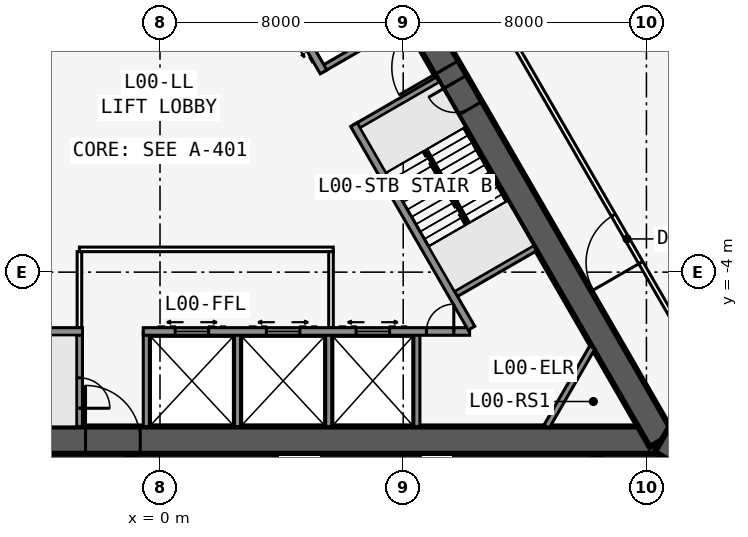
"""IFC4 building model, lengths in metres.
Left out: names, types, materials, properties, quantities, classifications, styles, units other than length and angle.
Written with IfcOpenShell. Run it as: python <this file> out.ifc"""

import sys

from ifc_helpers import new_model, si_unit, direction, frame, frame_2d, origin, place, context, subcontext, project, spatial, rectangle, extrude, element, fill, save


model = new_model("IFC4")
c1 = context("Model", 3, precision=1e-05, world=origin(), true_north=direction((0.0, 1.0)))
c2 = subcontext(c1, "Body", "Model", "MODEL_VIEW")
j1 = project(units=[si_unit("LENGTHUNIT", "METRE"), si_unit("PLANEANGLEUNIT", "RADIAN")], contexts=[c1])
p1 = place(None, origin())
s1 = spatial("IfcSite", under=j1, at=p1, CompositionType="ELEMENT")
p2 = place(p1, origin())
s2 = spatial("IfcBuilding", under=s1, at=p2, CompositionType="ELEMENT")
p3 = place(p2, origin())
s3 = spatial("IfcBuildingStorey", under=s2, at=p3, CompositionType="ELEMENT", Elevation=0.0)
p4 = place(p3, frame((-16.5, -9.526, -0.3), z_axis=(0.0, 0.0, 1.0), x_axis=(1.0, 0.0, 0.0)))
e1 = element("IfcWall", 1, at=p4, inside=s3, PredefinedType="SHEAR", context=c2, shape_type="SweptSolid", body=[
    extrude(rectangle(XDim=33.0, YDim=0.9, at=frame_2d((16.5, 0.0))), origin(), (0.0, 0.0, 1.0), 6.3),
])
p5 = place(p4, frame((14.05, 0.0, 0.3)))
e2 = element("IfcOpeningElement", 2, at=p5, cuts=e1, PredefinedType="OPENING", context=c2, shape_type="SweptSolid", body=[
    extrude(rectangle(XDim=1.8, YDim=2.13, at=frame_2d((0.9, 1.065))), frame((0.0, 0.46, 0.0), z_axis=(0.0, -1.0, 0.0), x_axis=(1.0, 0.0, 0.0)), (0.0, 0.0, 1.0), 0.92),
])
p6 = place(p3, frame((-10.183, -5.951, -0.3), z_axis=(0.0, 0.0, 1.0), x_axis=(1.0, 0.0, 0.0)))
e3 = element("IfcWall", 3, at=p6, inside=s3, PredefinedType="SOLIDWALL", context=c2, shape_type="SweptSolid", body=[
    extrude(rectangle(XDim=7.633, YDim=0.25, at=frame_2d((3.816, 0.0))), origin(), (0.0, 0.0, 1.0), 6.05),
])
p7 = place(p3, frame((-0.55, -5.951, -0.3), z_axis=(0.0, 0.0, 1.0), x_axis=(1.0, 0.0, 0.0)))
e4 = element("IfcWall", 4, at=p7, inside=s3, PredefinedType="SOLIDWALL", context=c2, shape_type="SweptSolid", body=[
    extrude(rectangle(XDim=10.733, YDim=0.25, at=frame_2d((5.366, 0.0))), origin(), (0.0, 0.0, 1.0), 6.05),
])
p8 = place(p7, frame((9.314, 0.0, 0.3)))
e5 = element("IfcOpeningElement", 5, at=p8, cuts=e4, PredefinedType="OPENING", context=c2, shape_type="SweptSolid", body=[
    extrude(rectangle(XDim=0.9, YDim=2.13, at=frame_2d((0.45, 1.065))), frame((0.0, 0.135, 0.0), z_axis=(0.0, -1.0, 0.0), x_axis=(1.0, 0.0, 0.0)), (0.0, 0.0, 1.0), 0.27),
])
p9 = place(p7, frame((1.05, 0.0, 0.3)))
e6 = element("IfcOpeningElement", 6, at=p9, cuts=e4, PredefinedType="OPENING", context=c2, shape_type="SweptSolid", body=[
    extrude(rectangle(XDim=1.1, YDim=2.13, at=frame_2d((0.55, 1.065))), frame((0.0, 0.135, 0.0), z_axis=(0.0, -1.0, 0.0), x_axis=(1.0, 0.0, 0.0)), (0.0, 0.0, 1.0), 0.27),
])
p10 = place(p7, frame((4.05, 0.0, 0.3)))
e7 = element("IfcOpeningElement", 7, at=p10, cuts=e4, PredefinedType="OPENING", context=c2, shape_type="SweptSolid", body=[
    extrude(rectangle(XDim=1.1, YDim=2.13, at=frame_2d((0.55, 1.065))), frame((0.0, 0.135, 0.0), z_axis=(0.0, -1.0, 0.0), x_axis=(1.0, 0.0, 0.0)), (0.0, 0.0, 1.0), 0.27),
])
p11 = place(p7, frame((7.0, 0.0, 0.3)))
e8 = element("IfcOpeningElement", 8, at=p11, cuts=e4, PredefinedType="OPENING", context=c2, shape_type="SweptSolid", body=[
    extrude(rectangle(XDim=1.1, YDim=2.13, at=frame_2d((0.55, 1.065))), frame((0.0, 0.135, 0.0), z_axis=(0.0, -1.0, 0.0), x_axis=(1.0, 0.0, 0.0)), (0.0, 0.0, 1.0), 0.27),
])
p12 = place(p3, frame((-2.65, -5.951, -0.3), z_axis=(0.0, 0.0, 1.0), x_axis=(0.0, -1.0, 0.0)))
e9 = element("IfcWall", 9, at=p12, inside=s3, PredefinedType="SOLIDWALL", context=c2, shape_type="SweptSolid", body=[
    extrude(rectangle(XDim=3.125, YDim=0.2, at=frame_2d((1.562, 0.0))), origin(), (0.0, 0.0, 1.0), 6.05),
])
p13 = place(p12, frame((1.525, 0.0, 0.3)))
e10 = element("IfcOpeningElement", 10, at=p13, cuts=e9, PredefinedType="OPENING", context=c2, shape_type="SweptSolid", body=[
    extrude(rectangle(XDim=1.0, YDim=2.13, at=frame_2d((0.5, 1.065))), frame((0.0, 0.11, 0.0), z_axis=(0.0, -1.0, 0.0), x_axis=(1.0, 0.0, 0.0)), (0.0, 0.0, 1.0), 0.22),
])
for number, where, z_axis, x_axis in (
    (11, (-0.45, -5.951, -0.3), (0.0, 0.0, 1.0), (0.0, -1.0, 0.0)),
    (12, (2.55, -5.951, -0.3), (0.0, 0.0, 1.0), (0.0, -1.0, 0.0)),
    (13, (5.55, -5.951, -0.3), (0.0, 0.0, 1.0), (0.0, -1.0, 0.0)),
    (14, (8.45, -5.951, -0.3), (0.0, 0.0, 1.0), (0.0, -1.0, 0.0)),
):
    element("IfcWall", number, at=place(p3, frame(where, z_axis=z_axis, x_axis=x_axis)), inside=s3, PredefinedType="SOLIDWALL", context=c2, shape_type="SweptSolid", body=[
        extrude(rectangle(XDim=3.125, YDim=0.2, at=frame_2d((1.562, 0.0))), origin(), (0.0, 0.0, 1.0), 6.05),
    ])
p14 = place(p3, frame((16.5, -9.526, -0.3), z_axis=(0.0, 0.0, 1.0), x_axis=(-0.499999749417, 0.866025548458, 0.0)))
e15 = element("IfcWall", 15, at=p14, inside=s3, PredefinedType="SHEAR", context=c2, shape_type="SweptSolid", body=[
    extrude(rectangle(XDim=33.0, YDim=0.9, at=frame_2d((16.5, 0.0))), origin(), (0.0, 0.0, 1.0), 6.3),
])
p15 = place(p14, frame((14.15, 0.0, 0.3)))
e16 = element("IfcOpeningElement", 16, at=p15, cuts=e15, PredefinedType="OPENING", context=c2, shape_type="SweptSolid", body=[
    extrude(rectangle(XDim=1.8, YDim=2.13, at=frame_2d((0.9, 1.065))), frame((0.0, 0.46, 0.0), z_axis=(0.0, -1.0, 0.0), x_axis=(1.0, 0.0, 0.0)), (0.0, 0.0, 1.0), 0.92),
])
p16 = place(p14, frame((12.6, 0.0, 0.3)))
e17 = element("IfcOpeningElement", 17, at=p16, cuts=e15, PredefinedType="OPENING", context=c2, shape_type="SweptSolid", body=[
    extrude(rectangle(XDim=1.0, YDim=2.13, at=frame_2d((0.5, 1.065))), frame((0.0, 0.46, 0.0), z_axis=(0.0, -1.0, 0.0), x_axis=(1.0, 0.0, 0.0)), (0.0, 0.0, 1.0), 0.92),
])
p17 = place(p3, frame((10.245, -5.843, -0.3), z_axis=(0.0, 0.0, 1.0), x_axis=(-0.499993009313, 0.866029439822, 0.0)))
e18 = element("IfcWall", 18, at=p17, inside=s3, PredefinedType="SOLIDWALL", context=c2, shape_type="SweptSolid", body=[
    extrude(rectangle(XDim=7.733, YDim=0.25, at=frame_2d((3.866, 0.0))), origin(), (0.0, 0.0, 1.0), 6.05),
])
p18 = place(p3, frame((5.379, 2.586, -0.3), z_axis=(0.0, 0.0, 1.0), x_axis=(-0.500001375892, 0.866024609411, 0.0)))
e19 = element("IfcWall", 19, at=p18, inside=s3, PredefinedType="SOLIDWALL", context=c2, shape_type="SweptSolid", body=[
    extrude(rectangle(XDim=10.633, YDim=0.25, at=frame_2d((5.316, 0.0))), origin(), (0.0, 0.0, 1.0), 6.05),
])
p19 = place(p18, frame((9.164, 0.0, 0.3)))
e20 = element("IfcOpeningElement", 20, at=p19, cuts=e19, PredefinedType="OPENING", context=c2, shape_type="SweptSolid", body=[
    extrude(rectangle(XDim=0.9, YDim=2.13, at=frame_2d((0.45, 1.065))), frame((0.0, 0.135, 0.0), z_axis=(0.0, -1.0, 0.0), x_axis=(1.0, 0.0, 0.0)), (0.0, 0.0, 1.0), 0.27),
])
p20 = place(p18, frame((1.0, 0.0, 0.3)))
e21 = element("IfcOpeningElement", 21, at=p20, cuts=e19, PredefinedType="OPENING", context=c2, shape_type="SweptSolid", body=[
    extrude(rectangle(XDim=1.1, YDim=2.13, at=frame_2d((0.55, 1.065))), frame((0.0, 0.135, 0.0), z_axis=(0.0, -1.0, 0.0), x_axis=(1.0, 0.0, 0.0)), (0.0, 0.0, 1.0), 0.27),
])
p21 = place(p18, frame((3.9, 0.0, 0.3)))
e22 = element("IfcOpeningElement", 22, at=p21, cuts=e19, PredefinedType="OPENING", context=c2, shape_type="SweptSolid", body=[
    extrude(rectangle(XDim=1.1, YDim=2.13, at=frame_2d((0.55, 1.065))), frame((0.0, 0.135, 0.0), z_axis=(0.0, -1.0, 0.0), x_axis=(1.0, 0.0, 0.0)), (0.0, 0.0, 1.0), 0.27),
])
p22 = place(p18, frame((6.8, 0.0, 0.3)))
e23 = element("IfcOpeningElement", 23, at=p22, cuts=e19, PredefinedType="OPENING", context=c2, shape_type="SweptSolid", body=[
    extrude(rectangle(XDim=1.1, YDim=2.13, at=frame_2d((0.55, 1.065))), frame((0.0, 0.135, 0.0), z_axis=(0.0, -1.0, 0.0), x_axis=(1.0, 0.0, 0.0)), (0.0, 0.0, 1.0), 0.27),
])
for number, where, z_axis, x_axis in (
    (24, (9.629, -4.775, -0.3), (0.0, 0.0, 1.0), (0.866, 0.5, 0.0)),
    (25, (6.429, 0.767, -0.3), (0.0, 0.0, 1.0), (0.866, 0.5, 0.0)),
    (26, (5.329, 2.673, -0.3), (0.0, 0.0, 1.0), (0.866, 0.5, 0.0)),
):
    element("IfcWall", number, at=place(p3, frame(where, z_axis=z_axis, x_axis=x_axis)), inside=s3, PredefinedType="SOLIDWALL", context=c2, shape_type="SweptSolid", body=[
        extrude(rectangle(XDim=3.125, YDim=0.2, at=frame_2d((1.562, 0.0))), origin(), (0.0, 0.0, 1.0), 6.05),
    ])
p23 = place(p3, frame((0.0, 19.052, -0.3), z_axis=(0.0, 0.0, 1.0), x_axis=(-0.499999749417, -0.866025548458, 0.0)))
e27 = element("IfcWall", 27, at=p23, inside=s3, PredefinedType="SHEAR", context=c2, shape_type="SweptSolid", body=[
    extrude(rectangle(XDim=33.0, YDim=0.9, at=frame_2d((16.5, 0.0))), origin(), (0.0, 0.0, 1.0), 6.3),
])
p24 = place(p23, frame((14.15, 0.0, 0.3)))
e28 = element("IfcOpeningElement", 28, at=p24, cuts=e27, PredefinedType="OPENING", context=c2, shape_type="SweptSolid", body=[
    extrude(rectangle(XDim=1.8, YDim=2.13, at=frame_2d((0.9, 1.065))), frame((0.0, 0.46, 0.0), z_axis=(0.0, -1.0, 0.0), x_axis=(1.0, 0.0, 0.0)), (0.0, 0.0, 1.0), 0.92),
])
p25 = place(p23, frame((12.6, 0.0, 0.3)))
e29 = element("IfcOpeningElement", 29, at=p25, cuts=e27, PredefinedType="OPENING", context=c2, shape_type="SweptSolid", body=[
    extrude(rectangle(XDim=1.0, YDim=2.13, at=frame_2d((0.5, 1.065))), frame((0.0, 0.46, 0.0), z_axis=(0.0, -1.0, 0.0), x_axis=(1.0, 0.0, 0.0)), (0.0, 0.0, 1.0), 0.92),
])
p26 = place(p3, frame((16.5, -9.526, -0.3), z_axis=(0.0, 0.0, 1.0), x_axis=(0.866031398331, -0.499989616998, 0.0)))
e30 = element("IfcWall", 30, at=p26, inside=s3, PredefinedType="SHEAR", context=c2, shape_type="SweptSolid", body=[
    extrude(rectangle(XDim=4.746, YDim=0.9, at=frame_2d((2.373, 0.0))), origin(), (0.0, 0.0, 1.0), 6.3),
])
p27 = place(p26, frame((1.8, 0.0, 0.3)))
e31 = element("IfcOpeningElement", 31, at=p27, cuts=e30, PredefinedType="OPENING", context=c2, shape_type="SweptSolid", body=[
    extrude(rectangle(XDim=1.8, YDim=2.13, at=frame_2d((0.9, 1.065))), frame((0.0, 0.46, 0.0), z_axis=(0.0, -1.0, 0.0), x_axis=(1.0, 0.0, 0.0)), (0.0, 0.0, 1.0), 0.92),
])
p28 = place(p3, frame((20.027, -10.985, -0.3), z_axis=(0.0, 0.0, 1.0), x_axis=(-0.500001677587, 0.866024435227, 0.0)))
e32 = element("IfcWall", 32, at=p28, inside=s3, PredefinedType="PARTITIONING", context=c2, shape_type="SweptSolid", body=[
    extrude(rectangle(XDim=39.054, YDim=0.15, at=frame_2d((19.527, 0.0))), origin(), (0.0, 0.0, 1.0), 5.108),
])
p29 = place(p28, frame((8.427, 0.0, 0.3)))
e33 = element("IfcOpeningElement", 33, at=p29, cuts=e32, PredefinedType="OPENING", context=c2, shape_type="SweptSolid", body=[
    extrude(rectangle(XDim=1.8, YDim=2.13, at=frame_2d((0.9, 1.065))), frame((0.0, 0.085, 0.0), z_axis=(0.0, -1.0, 0.0), x_axis=(1.0, 0.0, 0.0)), (0.0, 0.0, 1.0), 0.17),
])
p30 = place(p28, frame((18.427, 0.0, 0.3)))
e34 = element("IfcOpeningElement", 34, at=p30, cuts=e32, PredefinedType="OPENING", context=c2, shape_type="SweptSolid", body=[
    extrude(rectangle(XDim=1.8, YDim=2.13, at=frame_2d((0.9, 1.065))), frame((0.0, 0.085, 0.0), z_axis=(0.0, -1.0, 0.0), x_axis=(1.0, 0.0, 0.0)), (0.0, 0.0, 1.0), 0.17),
])
p31 = place(p28, frame((23.227, 0.0, 0.3)))
e35 = element("IfcOpeningElement", 35, at=p31, cuts=e32, PredefinedType="OPENING", context=c2, shape_type="SweptSolid", body=[
    extrude(rectangle(XDim=1.8, YDim=2.13, at=frame_2d((0.9, 1.065))), frame((0.0, 0.085, 0.0), z_axis=(0.0, -1.0, 0.0), x_axis=(1.0, 0.0, 0.0)), (0.0, 0.0, 1.0), 0.17),
])
p32 = place(p28, frame((27.627, 0.0, 0.3)))
e36 = element("IfcOpeningElement", 36, at=p32, cuts=e32, PredefinedType="OPENING", context=c2, shape_type="SweptSolid", body=[
    extrude(rectangle(XDim=1.0, YDim=2.13, at=frame_2d((0.5, 1.065))), frame((0.0, 0.085, 0.0), z_axis=(0.0, -1.0, 0.0), x_axis=(1.0, 0.0, 0.0)), (0.0, 0.0, 1.0), 0.17),
])
p33 = place(p28, frame((30.527, 0.0, 0.3)))
e37 = element("IfcOpeningElement", 37, at=p33, cuts=e32, PredefinedType="OPENING", context=c2, shape_type="SweptSolid", body=[
    extrude(rectangle(XDim=1.0, YDim=2.13, at=frame_2d((0.5, 1.065))), frame((0.0, 0.085, 0.0), z_axis=(0.0, -1.0, 0.0), x_axis=(1.0, 0.0, 0.0)), (0.0, 0.0, 1.0), 0.17),
])
p34 = place(p28, frame((33.277, 0.0, 0.3)))
e38 = element("IfcOpeningElement", 38, at=p34, cuts=e32, PredefinedType="OPENING", context=c2, shape_type="SweptSolid", body=[
    extrude(rectangle(XDim=1.0, YDim=2.13, at=frame_2d((0.5, 1.065))), frame((0.0, 0.085, 0.0), z_axis=(0.0, -1.0, 0.0), x_axis=(1.0, 0.0, 0.0)), (0.0, 0.0, 1.0), 0.17),
])
p35 = place(p28, frame((36.39, 0.0, 0.3)))
e39 = element("IfcOpeningElement", 39, at=p35, cuts=e32, PredefinedType="OPENING", context=c2, shape_type="SweptSolid", body=[
    extrude(rectangle(XDim=1.0, YDim=2.13, at=frame_2d((0.5, 1.065))), frame((0.0, 0.085, 0.0), z_axis=(0.0, -1.0, 0.0), x_axis=(1.0, 0.0, 0.0)), (0.0, 0.0, 1.0), 0.17),
])
p36 = place(p3, frame((-0.5, 22.836, -0.3), z_axis=(0.0, 0.0, 1.0), x_axis=(-0.500001677587, -0.866024435227, 0.0)))
e40 = element("IfcWall", 40, at=p36, inside=s3, PredefinedType="PARTITIONING", context=c2, shape_type="SweptSolid", body=[
    extrude(rectangle(XDim=39.054, YDim=0.15, at=frame_2d((19.527, 0.0))), origin(), (0.0, 0.0, 1.0), 5.108),
])
p37 = place(p36, frame((2.013, 0.0, 0.3)))
e41 = element("IfcOpeningElement", 41, at=p37, cuts=e40, PredefinedType="OPENING", context=c2, shape_type="SweptSolid", body=[
    extrude(rectangle(XDim=1.8, YDim=2.13, at=frame_2d((0.9, 1.065))), frame((0.0, 0.085, 0.0), z_axis=(0.0, -1.0, 0.0), x_axis=(1.0, 0.0, 0.0)), (0.0, 0.0, 1.0), 0.17),
])
p38 = place(p36, frame((10.427, 0.0, 0.3)))
e42 = element("IfcOpeningElement", 42, at=p38, cuts=e40, PredefinedType="OPENING", context=c2, shape_type="SweptSolid", body=[
    extrude(rectangle(XDim=1.8, YDim=2.13, at=frame_2d((0.9, 1.065))), frame((0.0, 0.085, 0.0), z_axis=(0.0, -1.0, 0.0), x_axis=(1.0, 0.0, 0.0)), (0.0, 0.0, 1.0), 0.17),
])
p39 = place(p36, frame((18.427, 0.0, 0.3)))
e43 = element("IfcOpeningElement", 43, at=p39, cuts=e40, PredefinedType="OPENING", context=c2, shape_type="SweptSolid", body=[
    extrude(rectangle(XDim=1.8, YDim=2.13, at=frame_2d((0.9, 1.065))), frame((0.0, 0.085, 0.0), z_axis=(0.0, -1.0, 0.0), x_axis=(1.0, 0.0, 0.0)), (0.0, 0.0, 1.0), 0.17),
])
p40 = place(p36, frame((23.227, 0.0, 0.3)))
e44 = element("IfcOpeningElement", 44, at=p40, cuts=e40, PredefinedType="OPENING", context=c2, shape_type="SweptSolid", body=[
    extrude(rectangle(XDim=1.8, YDim=2.13, at=frame_2d((0.9, 1.065))), frame((0.0, 0.085, 0.0), z_axis=(0.0, -1.0, 0.0), x_axis=(1.0, 0.0, 0.0)), (0.0, 0.0, 1.0), 0.17),
])
p41 = place(p36, frame((27.627, 0.0, 0.3)))
e45 = element("IfcOpeningElement", 45, at=p41, cuts=e40, PredefinedType="OPENING", context=c2, shape_type="SweptSolid", body=[
    extrude(rectangle(XDim=1.0, YDim=2.13, at=frame_2d((0.5, 1.065))), frame((0.0, 0.085, 0.0), z_axis=(0.0, -1.0, 0.0), x_axis=(1.0, 0.0, 0.0)), (0.0, 0.0, 1.0), 0.17),
])
p42 = place(p36, frame((30.277, 0.0, 0.3)))
e46 = element("IfcOpeningElement", 46, at=p42, cuts=e40, PredefinedType="OPENING", context=c2, shape_type="SweptSolid", body=[
    extrude(rectangle(XDim=1.0, YDim=2.13, at=frame_2d((0.5, 1.065))), frame((0.0, 0.085, 0.0), z_axis=(0.0, -1.0, 0.0), x_axis=(1.0, 0.0, 0.0)), (0.0, 0.0, 1.0), 0.17),
])
p43 = place(p36, frame((34.89, 0.0, 0.3)))
e47 = element("IfcOpeningElement", 47, at=p43, cuts=e40, PredefinedType="OPENING", context=c2, shape_type="SweptSolid", body=[
    extrude(rectangle(XDim=1.0, YDim=2.13, at=frame_2d((0.5, 1.065))), frame((0.0, 0.085, 0.0), z_axis=(0.0, -1.0, 0.0), x_axis=(1.0, 0.0, 0.0)), (0.0, 0.0, 1.0), 0.17),
])
p44 = place(p3, frame((-2.65, -3.251, -0.3), z_axis=(0.0, 0.0, 1.0), x_axis=(1.0, 0.0, 0.0)))
e48 = element("IfcWall", 48, at=p44, inside=s3, PredefinedType="PARTITIONING", context=c2, shape_type="SweptSolid", body=[
    extrude(rectangle(XDim=8.35, YDim=0.15, at=frame_2d((4.175, 0.0))), origin(), (0.0, 0.0, 1.0), 6.05),
])
for number, where, z_axis, x_axis in (
    (49, (-2.65, -5.826, -0.3), (0.0, 0.0, 1.0), (0.0, 1.0, 0.0)),
    (50, (5.625, -5.826, -0.3), (0.0, 0.0, 1.0), (0.0, 1.0, 0.0)),
):
    element("IfcWall", number, at=place(p3, frame(where, z_axis=z_axis, x_axis=x_axis)), inside=s3, PredefinedType="PARTITIONING", context=c2, shape_type="SweptSolid", body=[
        extrude(rectangle(XDim=2.5, YDim=0.15, at=frame_2d((1.25, 0.0))), origin(), (0.0, 0.0, 1.0), 6.05),
    ])
p45 = place(p3, frame((14.219, -6.476, -0.3), z_axis=(0.0, 0.0, 1.0), x_axis=(-0.499952404951, -0.866052881055, 0.0)))
e51 = element("IfcWall", 51, at=p45, inside=s3, PredefinedType="SOLIDWALL", context=c2, shape_type="SweptSolid", body=[
    extrude(rectangle(XDim=3.002, YDim=0.2, at=frame_2d((1.501, 0.0))), origin(), (0.0, 0.0, 1.0), 6.05),
])
p46 = place(p3, frame((10.135, -2.401, 0.0), z_axis=(0.0, 0.0, 1.0), x_axis=(-0.499992232847, 0.866029888106, 0.0)))
e52 = element("IfcWall", 52, at=p46, inside=s3, PredefinedType="SOLIDWALL", context=c2, shape_type="SweptSolid", body=[
    extrude(rectangle(XDim=2.794, YDim=0.1, at=frame_2d((1.397, 0.0))), origin(), (0.0, 0.0, 1.0), 6.0),
])
p47 = place(p29, origin())
e53 = element("IfcDoor", 53, at=p47, inside=s3, OperationType="DOUBLE_DOOR_SINGLE_SWING", PredefinedType="DOOR", context=c2, shape_type="SweptSolid", body=[
    extrude(rectangle(XDim=1.8, YDim=2.13, at=frame_2d((0.9, 1.065))), frame((0.0, 0.025, 0.0), z_axis=(0.0, -1.0, 0.0), x_axis=(1.0, 0.0, 0.0)), (0.0, 0.0, 1.0), 0.05),
])
fill(e33, e53)
p48 = place(p5, origin())
e54 = element("IfcDoor", 54, at=p48, inside=s3, OperationType="DOUBLE_DOOR_SINGLE_SWING", PredefinedType="DOOR", context=c2, shape_type="SweptSolid", body=[
    extrude(rectangle(XDim=1.8, YDim=2.13, at=frame_2d((0.9, 1.065))), frame((0.0, 0.025, 0.0), z_axis=(0.0, -1.0, 0.0), x_axis=(1.0, 0.0, 0.0)), (0.0, 0.0, 1.0), 0.05),
])
fill(e2, e54)
p49 = place(p13, origin())
e55 = element("IfcDoor", 55, at=p49, inside=s3, OperationType="SINGLE_SWING_RIGHT", PredefinedType="DOOR", context=c2, shape_type="SweptSolid", body=[
    extrude(rectangle(XDim=1.0, YDim=2.13, at=frame_2d((0.5, 1.065))), frame((0.0, 0.025, 0.0), z_axis=(0.0, -1.0, 0.0), x_axis=(1.0, 0.0, 0.0)), (0.0, 0.0, 1.0), 0.05),
])
fill(e10, e55)
p50 = place(p15, origin())
e56 = element("IfcDoor", 56, at=p50, inside=s3, OperationType="DOUBLE_DOOR_SINGLE_SWING", PredefinedType="DOOR", context=c2, shape_type="SweptSolid", body=[
    extrude(rectangle(XDim=1.8, YDim=2.13, at=frame_2d((0.9, 1.065))), frame((0.0, 0.025, 0.0), z_axis=(0.0, -1.0, 0.0), x_axis=(1.0, 0.0, 0.0)), (0.0, 0.0, 1.0), 0.05),
])
fill(e16, e56)
p51 = place(p16, origin())
e57 = element("IfcDoor", 57, at=p51, inside=s3, OperationType="SINGLE_SWING_RIGHT", PredefinedType="DOOR", context=c2, shape_type="SweptSolid", body=[
    extrude(rectangle(XDim=1.0, YDim=2.13, at=frame_2d((0.5, 1.065))), frame((0.0, 0.025, 0.0), z_axis=(0.0, -1.0, 0.0), x_axis=(1.0, 0.0, 0.0)), (0.0, 0.0, 1.0), 0.05),
])
fill(e17, e57)
p52 = place(p8, origin())
e58 = element("IfcDoor", 58, at=p52, inside=s3, OperationType="SINGLE_SWING_RIGHT", PredefinedType="DOOR", context=c2, shape_type="SweptSolid", body=[
    extrude(rectangle(XDim=0.9, YDim=2.13, at=frame_2d((0.45, 1.065))), frame((0.0, 0.025, 0.0), z_axis=(0.0, -1.0, 0.0), x_axis=(1.0, 0.0, 0.0)), (0.0, 0.0, 1.0), 0.05),
])
fill(e5, e58)
p53 = place(p9, origin())
e59 = element("IfcDoor", 59, at=p53, inside=s3, OperationType="DOUBLE_DOOR_SLIDING", PredefinedType="USERDEFINED", context=c2, shape_type="SweptSolid", body=[
    extrude(rectangle(XDim=1.1, YDim=2.13, at=frame_2d((0.55, 1.065))), frame((0.0, 0.025, 0.0), z_axis=(0.0, -1.0, 0.0), x_axis=(1.0, 0.0, 0.0)), (0.0, 0.0, 1.0), 0.05),
])
fill(e6, e59)
p54 = place(p10, origin())
e60 = element("IfcDoor", 60, at=p54, inside=s3, OperationType="DOUBLE_DOOR_SLIDING", PredefinedType="USERDEFINED", context=c2, shape_type="SweptSolid", body=[
    extrude(rectangle(XDim=1.1, YDim=2.13, at=frame_2d((0.55, 1.065))), frame((0.0, 0.025, 0.0), z_axis=(0.0, -1.0, 0.0), x_axis=(1.0, 0.0, 0.0)), (0.0, 0.0, 1.0), 0.05),
])
fill(e7, e60)
p55 = place(p11, origin())
e61 = element("IfcDoor", 61, at=p55, inside=s3, OperationType="DOUBLE_DOOR_SLIDING", PredefinedType="USERDEFINED", context=c2, shape_type="SweptSolid", body=[
    extrude(rectangle(XDim=1.1, YDim=2.13, at=frame_2d((0.55, 1.065))), frame((0.0, 0.025, 0.0), z_axis=(0.0, -1.0, 0.0), x_axis=(1.0, 0.0, 0.0)), (0.0, 0.0, 1.0), 0.05),
])
fill(e8, e61)
save(model, sys.argv[1])
